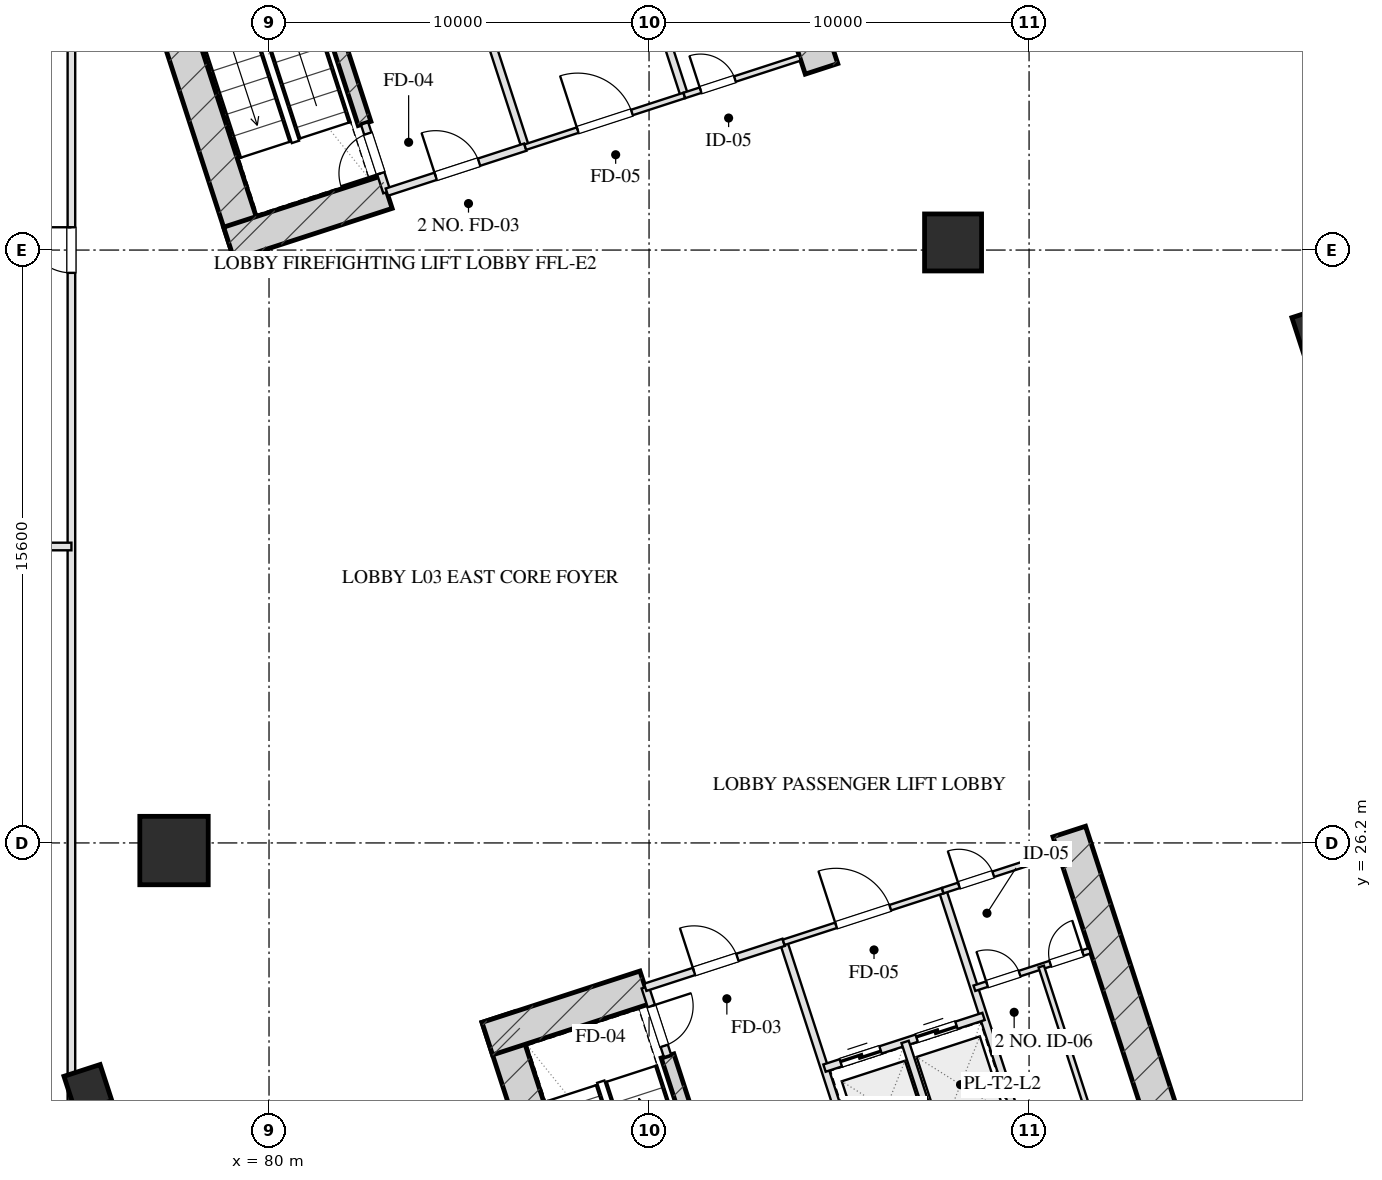
"""IFC4 building model, lengths in metres.
Left out: names, types, materials, properties, quantities, classifications, styles, units other than length and angle.
Written with IfcOpenShell. Run it as: python <this file> out.ifc"""

import sys

from ifc_helpers import new_model, si_unit, direction, frame, frame_2d, origin, origin_2d, place, context, subcontext, project, spatial, rectangle, hollow_rectangle, extrude, element, fill, save


model = new_model("IFC4")
c1 = context("Model", 3, precision=1e-05, world=origin(), true_north=direction((0.0, 1.0)))
c2 = subcontext(c1, "Body", "Model", "MODEL_VIEW")
j1 = project(units=[si_unit("LENGTHUNIT", "METRE"), si_unit("PLANEANGLEUNIT", "RADIAN")], contexts=[c1])
p1 = place(None, origin())
s1 = spatial("IfcSite", under=j1, at=p1, CompositionType="ELEMENT")
p2 = place(p1, origin())
s2 = spatial("IfcBuilding", under=s1, at=p2, CompositionType="ELEMENT")
p3 = place(p2, frame((0.0, 0.0, 16.5)))
s3 = spatial("IfcBuildingStorey", under=s2, at=p3, CompositionType="ELEMENT", Elevation=16.5)
p4 = place(p3, frame((86.032, 21.618, 0.0), z_axis=(0.0, 0.0, 1.0), x_axis=(0.30901438634, -0.951057363693, 0.0)))
e1 = element("IfcWall", 1, at=p4, inside=s3, PredefinedType="SHEAR", context=c2, shape_type="SweptSolid", body=[
    extrude(rectangle(XDim=9.78, YDim=0.9, at=frame_2d((4.89, 0.0))), origin(), (0.0, 0.0, 1.0), 5.5),
])
p5 = place(p3, frame((101.059, 26.5, 0.0), z_axis=(0.0, 0.0, 1.0), x_axis=(0.309021722829, -0.951054979914, 0.0)))
e2 = element("IfcWall", 2, at=p5, inside=s3, PredefinedType="SHEAR", context=c2, shape_type="SweptSolid", body=[
    extrude(rectangle(XDim=9.78, YDim=0.9, at=frame_2d((4.89, 0.0))), origin(), (0.0, 0.0, 1.0), 5.5),
])
p6 = place(p3, frame((90.486, 20.594, 0.0), z_axis=(0.0, 0.0, 1.0), x_axis=(0.309020428229, -0.951055400562, 0.0)))
e3 = element("IfcWall", 3, at=p6, inside=s3, PredefinedType="SHEAR", context=c2, shape_type="SweptSolid", body=[
    extrude(rectangle(XDim=6.98, YDim=0.35, at=frame_2d((3.49, 0.0))), origin(), (0.0, 0.0, 1.0), 5.5),
])
p7 = place(p3, frame((85.743, 21.051, 0.0), z_axis=(0.0, 0.0, 1.0), x_axis=(0.951063623806, 0.308995118848, 0.0)))
e4 = element("IfcWall", 4, at=p7, inside=s3, PredefinedType="SHEAR", context=c2, shape_type="SweptSolid", body=[
    extrude(rectangle(XDim=4.37, YDim=0.9, at=frame_2d((2.185, 0.0))), origin(), (0.0, 0.0, 1.0), 5.5),
])
for number, where, z_axis, x_axis in (
    (5, (79.512, 41.685, 0.0), (0.0, 0.0, 1.0), (-0.309, 0.951, 0.0)),
    (6, (94.539, 46.568, 0.0), (0.0, 0.0, 1.0), (-0.309, 0.951, 0.0)),
):
    element("IfcWall", number, at=place(p3, frame(where, z_axis=z_axis, x_axis=x_axis)), inside=s3, PredefinedType="SHEAR", context=c2, shape_type="SweptSolid", body=[
        extrude(rectangle(XDim=9.78, YDim=0.9, at=frame_2d((4.89, 0.0))), origin(), (0.0, 0.0, 1.0), 5.5),
    ])
p8 = place(p3, frame((82.514, 45.131, 0.0), z_axis=(0.0, 0.0, 1.0), x_axis=(-0.308988790936, 0.951065679686, 0.0)))
e7 = element("IfcWall", 7, at=p8, inside=s3, PredefinedType="SHEAR", context=c2, shape_type="SweptSolid", body=[
    extrude(rectangle(XDim=6.98, YDim=0.35, at=frame_2d((3.49, 0.0))), origin(), (0.0, 0.0, 1.0), 5.5),
])
p9 = place(p3, frame((78.945, 41.974, 0.0), z_axis=(0.0, 0.0, 1.0), x_axis=(0.951058289404, 0.309011537255, 0.0)))
e8 = element("IfcWall", 8, at=p9, inside=s3, PredefinedType="SHEAR", context=c2, shape_type="SweptSolid", body=[
    extrude(rectangle(XDim=4.37, YDim=0.9, at=frame_2d((2.185, 0.0))), origin(), (0.0, 0.0, 1.0), 5.5),
])
p10 = place(p3, frame((77.5, 26.0, 0.0), z_axis=(0.0, 0.0, 1.0), x_axis=(1.0, 0.0, 0.0)))
e9 = element("IfcColumn", 9, at=p10, inside=s3, PredefinedType="COLUMN", context=c2, shape_type="SweptSolid", body=[
    extrude(hollow_rectangle(XDim=1.8, YDim=1.8, WallThickness=0.06, at=origin_2d()), origin(), (0.0, 0.0, 1.0), 5.501),
])
p11 = place(p3, frame((98.0, 42.0, 0.0), z_axis=(0.0, 0.0, 1.0), x_axis=(1.0, 0.0, 0.0)))
e10 = element("IfcColumn", 10, at=p11, inside=s3, PredefinedType="COLUMN", context=c2, shape_type="SweptSolid", body=[
    extrude(rectangle(XDim=1.5, YDim=1.5, at=origin_2d()), origin(), (0.0, 0.0, 1.0), 5.501),
])
for number, where, z_axis, x_axis in (
    (11, (75.234, 19.739, 0.0), (0.0, 0.0, 1.0), (0.951, 0.309, 0.0)),
    (12, (107.547, 39.701, 0.0), (0.0, 0.0, 1.0), (0.951, 0.309, 0.0)),
):
    element("IfcColumn", number, at=place(p3, frame(where, z_axis=z_axis, x_axis=x_axis)), inside=s3, PredefinedType="COLUMN", context=c2, shape_type="SweptSolid", body=[
        extrude(hollow_rectangle(XDim=1.0, YDim=1.0, WallThickness=0.036, at=origin_2d()), origin(), (0.0, 0.0, 1.0), 5.501),
    ])
p12 = place(p3, frame((89.899, 22.401, 0.0), z_axis=(0.0, 0.0, 1.0), x_axis=(0.308932062672, -0.951084108086, 0.0)))
e13 = element("IfcWall", 13, at=p12, inside=s3, PredefinedType="PARTITIONING", context=c2, shape_type="SweptSolid", body=[
    extrude(rectangle(XDim=1.9, YDim=0.2, at=frame_2d((0.95, 0.0))), origin(), (0.0, 0.0, 1.0), 5.185),
])
p13 = place(p12, frame((0.52, 0.0, 0.0)))
e14 = element("IfcOpeningElement", 14, at=p13, cuts=e13, PredefinedType="OPENING", context=c2, shape_type="SweptSolid", body=[
    extrude(rectangle(XDim=1.1, YDim=2.05, at=frame_2d((0.55, 1.025))), frame((0.0, 0.11, 0.0), z_axis=(0.0, -1.0, 0.0), x_axis=(1.0, 0.0, 0.0)), (0.0, 0.0, 1.0), 0.22),
])
p14 = place(p3, frame((93.542, 23.585, 0.0), z_axis=(0.0, 0.0, 1.0), x_axis=(0.309042196757, -0.951048327176, 0.0)))
e15 = element("IfcWall", 15, at=p14, inside=s3, PredefinedType="PARTITIONING", context=c2, shape_type="SweptSolid", body=[
    extrude(rectangle(XDim=8.43, YDim=0.2, at=frame_2d((4.215, 0.0))), origin(), (0.0, 0.0, 1.0), 5.185),
])
p15 = place(p3, frame((89.899, 22.401, 0.0), z_axis=(0.0, 0.0, 1.0), x_axis=(0.951046716504, 0.309047153403, 0.0)))
e16 = element("IfcWall", 16, at=p15, inside=s3, PredefinedType="PARTITIONING", context=c2, shape_type="SweptSolid", body=[
    extrude(rectangle(XDim=3.83, YDim=0.2, at=frame_2d((1.915, 0.0))), origin(), (0.0, 0.0, 1.0), 5.185),
])
p16 = place(p15, frame((1.35, 0.0, 0.0)))
e17 = element("IfcOpeningElement", 17, at=p16, cuts=e16, PredefinedType="OPENING", context=c2, shape_type="SweptSolid", body=[
    extrude(rectangle(XDim=1.2, YDim=2.05, at=frame_2d((0.6, 1.025))), frame((0.0, 0.11, 0.0), z_axis=(0.0, -1.0, 0.0), x_axis=(1.0, 0.0, 0.0)), (0.0, 0.0, 1.0), 0.22),
])
p17 = place(p3, frame((97.727, 24.944, 0.0), z_axis=(0.0, 0.0, 1.0), x_axis=(0.309016001439, -0.951056838919, 0.0)))
e18 = element("IfcWall", 18, at=p17, inside=s3, PredefinedType="PARTITIONING", context=c2, shape_type="SweptSolid", body=[
    extrude(rectangle(XDim=8.43, YDim=0.2, at=frame_2d((4.215, 0.0))), origin(), (0.0, 0.0, 1.0), 5.185),
])
p18 = place(p3, frame((93.542, 23.585, 0.0), z_axis=(0.0, 0.0, 1.0), x_axis=(0.951063829732, 0.308994485023, 0.0)))
e19 = element("IfcWall", 19, at=p18, inside=s3, PredefinedType="PARTITIONING", context=c2, shape_type="SweptSolid", body=[
    extrude(rectangle(XDim=4.4, YDim=0.15, at=frame_2d((2.2, 0.0))), origin(), (0.0, 0.0, 1.0), 5.185),
])
p19 = place(p18, frame((1.45, 0.0, 0.0)))
e20 = element("IfcOpeningElement", 20, at=p19, cuts=e19, PredefinedType="OPENING", context=c2, shape_type="SweptSolid", body=[
    extrude(rectangle(XDim=1.5, YDim=2.05, at=frame_2d((0.75, 1.025))), frame((0.0, 0.085, 0.0), z_axis=(0.0, -1.0, 0.0), x_axis=(1.0, 0.0, 0.0)), (0.0, 0.0, 1.0), 0.17),
])
p20 = place(p3, frame((94.617, 20.275, 0.0), z_axis=(0.0, 0.0, 1.0), x_axis=(0.951058531764, 0.30901079133, 0.0)))
e21 = element("IfcWall", 21, at=p20, inside=s3, PredefinedType="PARTITIONING", context=c2, shape_type="SweptSolid", body=[
    extrude(rectangle(XDim=4.4, YDim=0.2, at=frame_2d((2.2, 0.0))), origin(), (0.0, 0.0, 1.0), 5.185),
])
p21 = place(p20, frame((0.45, 0.0, 0.0)))
e22 = element("IfcOpeningElement", 22, at=p21, cuts=e21, PredefinedType="OPENING", context=c2, shape_type="SweptSolid", body=[
    extrude(rectangle(XDim=1.1, YDim=2.05, at=frame_2d((0.55, 1.025))), frame((0.0, 0.11, 0.0), z_axis=(0.0, -1.0, 0.0), x_axis=(1.0, 0.0, 0.0)), (0.0, 0.0, 1.0), 0.22),
])
p22 = place(p20, frame((2.55, 0.0, 0.0)))
e23 = element("IfcOpeningElement", 23, at=p22, cuts=e21, PredefinedType="OPENING", context=c2, shape_type="SweptSolid", body=[
    extrude(rectangle(XDim=1.1, YDim=2.05, at=frame_2d((0.55, 1.025))), frame((0.0, 0.11, 0.0), z_axis=(0.0, -1.0, 0.0), x_axis=(1.0, 0.0, 0.0)), (0.0, 0.0, 1.0), 0.22),
])
p23 = place(p3, frame((96.738, 20.964, 0.0), z_axis=(0.0, 0.0, 1.0), x_axis=(0.309042578481, -0.951048203135, 0.0)))
e24 = element("IfcWall", 24, at=p23, inside=s3, PredefinedType="PARTITIONING", context=c2, shape_type="SweptSolid", body=[
    extrude(rectangle(XDim=4.95, YDim=0.2, at=frame_2d((2.475, 0.0))), origin(), (0.0, 0.0, 1.0), 5.185),
])
p24 = place(p3, frame((97.727, 24.944, 0.0), z_axis=(0.0, 0.0, 1.0), x_axis=(0.951036872128, 0.309077446369, 0.0)))
e25 = element("IfcWall", 25, at=p24, inside=s3, PredefinedType="PARTITIONING", context=c2, shape_type="SweptSolid", body=[
    extrude(rectangle(XDim=3.2, YDim=0.15, at=frame_2d((1.6, 0.0))), origin(), (0.0, 0.0, 1.0), 5.185),
])
p25 = place(p24, frame((0.45, 0.0, 0.0)))
e26 = element("IfcOpeningElement", 26, at=p25, cuts=e25, PredefinedType="OPENING", context=c2, shape_type="SweptSolid", body=[
    extrude(rectangle(XDim=0.95, YDim=2.05, at=frame_2d((0.475, 1.025))), frame((0.0, 0.085, 0.0), z_axis=(0.0, -1.0, 0.0), x_axis=(1.0, 0.0, 0.0)), (0.0, 0.0, 1.0), 0.17),
])
p26 = place(p3, frame((98.561, 22.376, 0.0), z_axis=(0.0, 0.0, 1.0), x_axis=(0.95104415986, 0.309055020985, 0.0)))
e27 = element("IfcWall", 27, at=p26, inside=s3, PredefinedType="PARTITIONING", context=c2, shape_type="SweptSolid", body=[
    extrude(rectangle(XDim=3.2, YDim=0.15, at=frame_2d((1.6, 0.0))), origin(), (0.0, 0.0, 1.0), 5.185),
])
p27 = place(p26, frame((0.35, 0.0, 0.0)))
e28 = element("IfcOpeningElement", 28, at=p27, cuts=e27, PredefinedType="OPENING", context=c2, shape_type="SweptSolid", body=[
    extrude(rectangle(XDim=0.9, YDim=2.05, at=frame_2d((0.45, 1.025))), frame((0.0, 0.085, 0.0), z_axis=(0.0, -1.0, 0.0), x_axis=(1.0, 0.0, 0.0)), (0.0, 0.0, 1.0), 0.17),
])
p28 = place(p26, frame((2.1, 0.0, 0.0)))
e29 = element("IfcOpeningElement", 29, at=p28, cuts=e27, PredefinedType="OPENING", context=c2, shape_type="SweptSolid", body=[
    extrude(rectangle(XDim=0.9, YDim=2.05, at=frame_2d((0.45, 1.025))), frame((0.0, 0.085, 0.0), z_axis=(0.0, -1.0, 0.0), x_axis=(1.0, 0.0, 0.0)), (0.0, 0.0, 1.0), 0.17),
])
p29 = place(p3, frame((100.32, 22.948, 0.0), z_axis=(0.0, 0.0, 1.0), x_axis=(0.309035009867, -0.951050662518, 0.0)))
e30 = element("IfcWall", 30, at=p29, inside=s3, PredefinedType="PARTITIONING", context=c2, shape_type="SweptSolid", body=[
    extrude(rectangle(XDim=5.73, YDim=0.15, at=frame_2d((2.865, 0.0))), origin(), (0.0, 0.0, 1.0), 5.185),
])
p30 = place(p3, frame((83.101, 43.324, 0.0), z_axis=(0.0, 0.0, 1.0), x_axis=(-0.309048298632, 0.951046344356, 0.0)))
e31 = element("IfcWall", 31, at=p30, inside=s3, PredefinedType="PARTITIONING", context=c2, shape_type="SweptSolid", body=[
    extrude(rectangle(XDim=1.9, YDim=0.2, at=frame_2d((0.95, 0.0))), origin(), (0.0, 0.0, 1.0), 5.185),
])
p31 = place(p30, frame((0.52, 0.0, 0.0)))
e32 = element("IfcOpeningElement", 32, at=p31, cuts=e31, PredefinedType="OPENING", context=c2, shape_type="SweptSolid", body=[
    extrude(rectangle(XDim=1.1, YDim=2.05, at=frame_2d((0.55, 1.025))), frame((0.0, 0.11, 0.0), z_axis=(0.0, -1.0, 0.0), x_axis=(1.0, 0.0, 0.0)), (0.0, 0.0, 1.0), 0.22),
])
p32 = place(p3, frame((86.743, 44.508, 0.0), z_axis=(0.0, 0.0, 1.0), x_axis=(-0.309016001439, 0.951056838919, 0.0)))
e33 = element("IfcWall", 33, at=p32, inside=s3, PredefinedType="PARTITIONING", context=c2, shape_type="SweptSolid", body=[
    extrude(rectangle(XDim=8.43, YDim=0.2, at=frame_2d((4.215, 0.0))), origin(), (0.0, 0.0, 1.0), 5.185),
])
p33 = place(p3, frame((83.101, 43.324, 0.0), z_axis=(0.0, 0.0, 1.0), x_axis=(0.951052804469, 0.309028417967, 0.0)))
e34 = element("IfcWall", 34, at=p33, inside=s3, PredefinedType="PARTITIONING", context=c2, shape_type="SweptSolid", body=[
    extrude(rectangle(XDim=3.83, YDim=0.2, at=frame_2d((1.915, 0.0))), origin(), (0.0, 0.0, 1.0), 5.185),
])
p34 = place(p33, frame((1.35, 0.0, 0.0)))
e35 = element("IfcOpeningElement", 35, at=p34, cuts=e34, PredefinedType="OPENING", context=c2, shape_type="SweptSolid", body=[
    extrude(rectangle(XDim=1.2, YDim=2.05, at=frame_2d((0.6, 1.025))), frame((0.0, 0.11, 0.0), z_axis=(0.0, -1.0, 0.0), x_axis=(1.0, 0.0, 0.0)), (0.0, 0.0, 1.0), 0.22),
])
p35 = place(p3, frame((90.928, 45.868, 0.0), z_axis=(0.0, 0.0, 1.0), x_axis=(-0.309042196757, 0.951048327176, 0.0)))
e36 = element("IfcWall", 36, at=p35, inside=s3, PredefinedType="PARTITIONING", context=c2, shape_type="SweptSolid", body=[
    extrude(rectangle(XDim=8.43, YDim=0.2, at=frame_2d((4.215, 0.0))), origin(), (0.0, 0.0, 1.0), 5.185),
])
p36 = place(p3, frame((86.743, 44.508, 0.0), z_axis=(0.0, 0.0, 1.0), x_axis=(0.951063829732, 0.308994485023, 0.0)))
e37 = element("IfcWall", 37, at=p36, inside=s3, PredefinedType="PARTITIONING", context=c2, shape_type="SweptSolid", body=[
    extrude(rectangle(XDim=4.4, YDim=0.15, at=frame_2d((2.2, 0.0))), origin(), (0.0, 0.0, 1.0), 5.185),
])
p37 = place(p36, frame((1.45, 0.0, 0.0)))
e38 = element("IfcOpeningElement", 38, at=p37, cuts=e37, PredefinedType="OPENING", context=c2, shape_type="SweptSolid", body=[
    extrude(rectangle(XDim=1.5, YDim=2.05, at=frame_2d((0.75, 1.025))), frame((0.0, 0.085, 0.0), z_axis=(0.0, -1.0, 0.0), x_axis=(1.0, 0.0, 0.0)), (0.0, 0.0, 1.0), 0.17),
])
p38 = place(p3, frame((90.928, 45.868, 0.0), z_axis=(0.0, 0.0, 1.0), x_axis=(0.951059297078, 0.309008435874, 0.0)))
e39 = element("IfcWall", 39, at=p38, inside=s3, PredefinedType="PARTITIONING", context=c2, shape_type="SweptSolid", body=[
    extrude(rectangle(XDim=3.2, YDim=0.15, at=frame_2d((1.6, 0.0))), origin(), (0.0, 0.0, 1.0), 5.185),
])
p39 = place(p38, frame((0.45, 0.0, 0.0)))
e40 = element("IfcOpeningElement", 40, at=p39, cuts=e39, PredefinedType="OPENING", context=c2, shape_type="SweptSolid", body=[
    extrude(rectangle(XDim=0.95, YDim=2.05, at=frame_2d((0.475, 1.025))), frame((0.0, 0.085, 0.0), z_axis=(0.0, -1.0, 0.0), x_axis=(1.0, 0.0, 0.0)), (0.0, 0.0, 1.0), 0.17),
])
p40 = place(p3, frame((74.8, 18.2, 0.0), z_axis=(0.0, 0.0, 1.0), x_axis=(0.0, 1.0, 0.0)))
e41 = element("IfcWall", 41, at=p40, inside=s3, PredefinedType="PARTITIONING", context=c2, shape_type="SweptSolid", body=[
    extrude(rectangle(XDim=31.6, YDim=0.2, at=frame_2d((15.8, 0.0))), origin(), (0.0, 0.0, 1.0), 5.185),
])
p41 = place(p40, frame((23.0, 0.0, 0.0)))
e42 = element("IfcOpeningElement", 42, at=p41, cuts=e41, PredefinedType="OPENING", context=c2, shape_type="SweptSolid", body=[
    extrude(rectangle(XDim=1.2, YDim=2.05, at=frame_2d((0.6, 1.025))), frame((0.0, 0.11, 0.0), z_axis=(0.0, -1.0, 0.0), x_axis=(1.0, 0.0, 0.0)), (0.0, 0.0, 1.0), 0.22),
])
p42 = place(p3, frame((44.2, 34.0, 0.0), z_axis=(0.0, 0.0, 1.0), x_axis=(1.0, 0.0, 0.0)))
e43 = element("IfcWall", 43, at=p42, inside=s3, PredefinedType="PARTITIONING", context=c2, shape_type="SweptSolid", body=[
    extrude(rectangle(XDim=30.6, YDim=0.2, at=frame_2d((15.3, 0.0))), origin(), (0.0, 0.0, 1.0), 3.775),
])
p43 = place(p13, origin())
e44 = element("IfcDoor", 44, at=p43, inside=s3, OperationType="SINGLE_SWING_LEFT", PredefinedType="DOOR", context=c2, shape_type="SweptSolid", body=[
    extrude(rectangle(XDim=1.1, YDim=2.05, at=frame_2d((0.55, 1.025))), frame((0.0, 0.025, 0.0), z_axis=(0.0, -1.0, 0.0), x_axis=(1.0, 0.0, 0.0)), (0.0, 0.0, 1.0), 0.05),
])
fill(e14, e44)
p44 = place(p16, origin())
e45 = element("IfcDoor", 45, at=p44, inside=s3, OperationType="SINGLE_SWING_LEFT", PredefinedType="DOOR", context=c2, shape_type="SweptSolid", body=[
    extrude(rectangle(XDim=1.2, YDim=2.05, at=frame_2d((0.6, 1.025))), frame((0.0, 0.025, 0.0), z_axis=(0.0, -1.0, 0.0), x_axis=(1.0, 0.0, 0.0)), (0.0, 0.0, 1.0), 0.05),
])
fill(e17, e45)
p45 = place(p19, origin())
e46 = element("IfcDoor", 46, at=p45, inside=s3, OperationType="SINGLE_SWING_LEFT", PredefinedType="DOOR", context=c2, shape_type="SweptSolid", body=[
    extrude(rectangle(XDim=1.5, YDim=2.05, at=frame_2d((0.75, 1.025))), frame((0.0, 0.025, 0.0), z_axis=(0.0, -1.0, 0.0), x_axis=(1.0, 0.0, 0.0)), (0.0, 0.0, 1.0), 0.05),
])
fill(e20, e46)
p46 = place(p21, origin())
e47 = element("IfcDoor", 47, at=p46, inside=s3, OperationType="DOUBLE_DOOR_SLIDING", PredefinedType="DOOR", context=c2, shape_type="SweptSolid", body=[
    extrude(rectangle(XDim=1.1, YDim=2.05, at=frame_2d((0.55, 1.025))), frame((0.0, 0.025, 0.0), z_axis=(0.0, -1.0, 0.0), x_axis=(1.0, 0.0, 0.0)), (0.0, 0.0, 1.0), 0.05),
])
fill(e22, e47)
p47 = place(p22, origin())
e48 = element("IfcDoor", 48, at=p47, inside=s3, OperationType="DOUBLE_DOOR_SLIDING", PredefinedType="DOOR", context=c2, shape_type="SweptSolid", body=[
    extrude(rectangle(XDim=1.1, YDim=2.05, at=frame_2d((0.55, 1.025))), frame((0.0, 0.025, 0.0), z_axis=(0.0, -1.0, 0.0), x_axis=(1.0, 0.0, 0.0)), (0.0, 0.0, 1.0), 0.05),
])
fill(e23, e48)
p48 = place(p25, origin())
e49 = element("IfcDoor", 49, at=p48, inside=s3, OperationType="SINGLE_SWING_LEFT", PredefinedType="DOOR", context=c2, shape_type="SweptSolid", body=[
    extrude(rectangle(XDim=0.95, YDim=2.05, at=frame_2d((0.475, 1.025))), frame((0.0, 0.025, 0.0), z_axis=(0.0, -1.0, 0.0), x_axis=(1.0, 0.0, 0.0)), (0.0, 0.0, 1.0), 0.05),
])
fill(e26, e49)
p49 = place(p27, origin())
e50 = element("IfcDoor", 50, at=p49, inside=s3, OperationType="SINGLE_SWING_LEFT", PredefinedType="DOOR", context=c2, shape_type="SweptSolid", body=[
    extrude(rectangle(XDim=0.9, YDim=2.05, at=frame_2d((0.45, 1.025))), frame((0.0, 0.025, 0.0), z_axis=(0.0, -1.0, 0.0), x_axis=(1.0, 0.0, 0.0)), (0.0, 0.0, 1.0), 0.05),
])
fill(e28, e50)
p50 = place(p28, origin())
e51 = element("IfcDoor", 51, at=p50, inside=s3, OperationType="SINGLE_SWING_RIGHT", PredefinedType="DOOR", context=c2, shape_type="SweptSolid", body=[
    extrude(rectangle(XDim=0.9, YDim=2.05, at=frame_2d((0.45, 1.025))), frame((0.0, 0.025, 0.0), z_axis=(0.0, -1.0, 0.0), x_axis=(1.0, 0.0, 0.0)), (0.0, 0.0, 1.0), 0.05),
])
fill(e29, e51)
p51 = place(p31, origin())
e52 = element("IfcDoor", 52, at=p51, inside=s3, OperationType="SINGLE_SWING_LEFT", PredefinedType="DOOR", context=c2, shape_type="SweptSolid", body=[
    extrude(rectangle(XDim=1.1, YDim=2.05, at=frame_2d((0.55, 1.025))), frame((0.0, 0.025, 0.0), z_axis=(0.0, -1.0, 0.0), x_axis=(1.0, 0.0, 0.0)), (0.0, 0.0, 1.0), 0.05),
])
fill(e32, e52)
p52 = place(p34, origin())
e53 = element("IfcDoor", 53, at=p52, inside=s3, OperationType="SINGLE_SWING_LEFT", PredefinedType="DOOR", context=c2, shape_type="SweptSolid", body=[
    extrude(rectangle(XDim=1.2, YDim=2.05, at=frame_2d((0.6, 1.025))), frame((0.0, 0.025, 0.0), z_axis=(0.0, -1.0, 0.0), x_axis=(1.0, 0.0, 0.0)), (0.0, 0.0, 1.0), 0.05),
])
fill(e35, e53)
p53 = place(p37, origin())
e54 = element("IfcDoor", 54, at=p53, inside=s3, OperationType="SINGLE_SWING_LEFT", PredefinedType="DOOR", context=c2, shape_type="SweptSolid", body=[
    extrude(rectangle(XDim=1.5, YDim=2.05, at=frame_2d((0.75, 1.025))), frame((0.0, 0.025, 0.0), z_axis=(0.0, -1.0, 0.0), x_axis=(1.0, 0.0, 0.0)), (0.0, 0.0, 1.0), 0.05),
])
fill(e38, e54)
p54 = place(p39, origin())
e55 = element("IfcDoor", 55, at=p54, inside=s3, OperationType="SINGLE_SWING_LEFT", PredefinedType="DOOR", context=c2, shape_type="SweptSolid", body=[
    extrude(rectangle(XDim=0.95, YDim=2.05, at=frame_2d((0.475, 1.025))), frame((0.0, 0.025, 0.0), z_axis=(0.0, -1.0, 0.0), x_axis=(1.0, 0.0, 0.0)), (0.0, 0.0, 1.0), 0.05),
])
fill(e40, e55)
p55 = place(p41, origin())
e56 = element("IfcDoor", 56, at=p55, inside=s3, OperationType="SINGLE_SWING_RIGHT", PredefinedType="DOOR", context=c2, shape_type="SweptSolid", body=[
    extrude(rectangle(XDim=1.2, YDim=2.05, at=frame_2d((0.6, 1.025))), frame((0.0, 0.025, 0.0), z_axis=(0.0, -1.0, 0.0), x_axis=(1.0, 0.0, 0.0)), (0.0, 0.0, 1.0), 0.05),
])
fill(e42, e56)
save(model, sys.argv[1])
